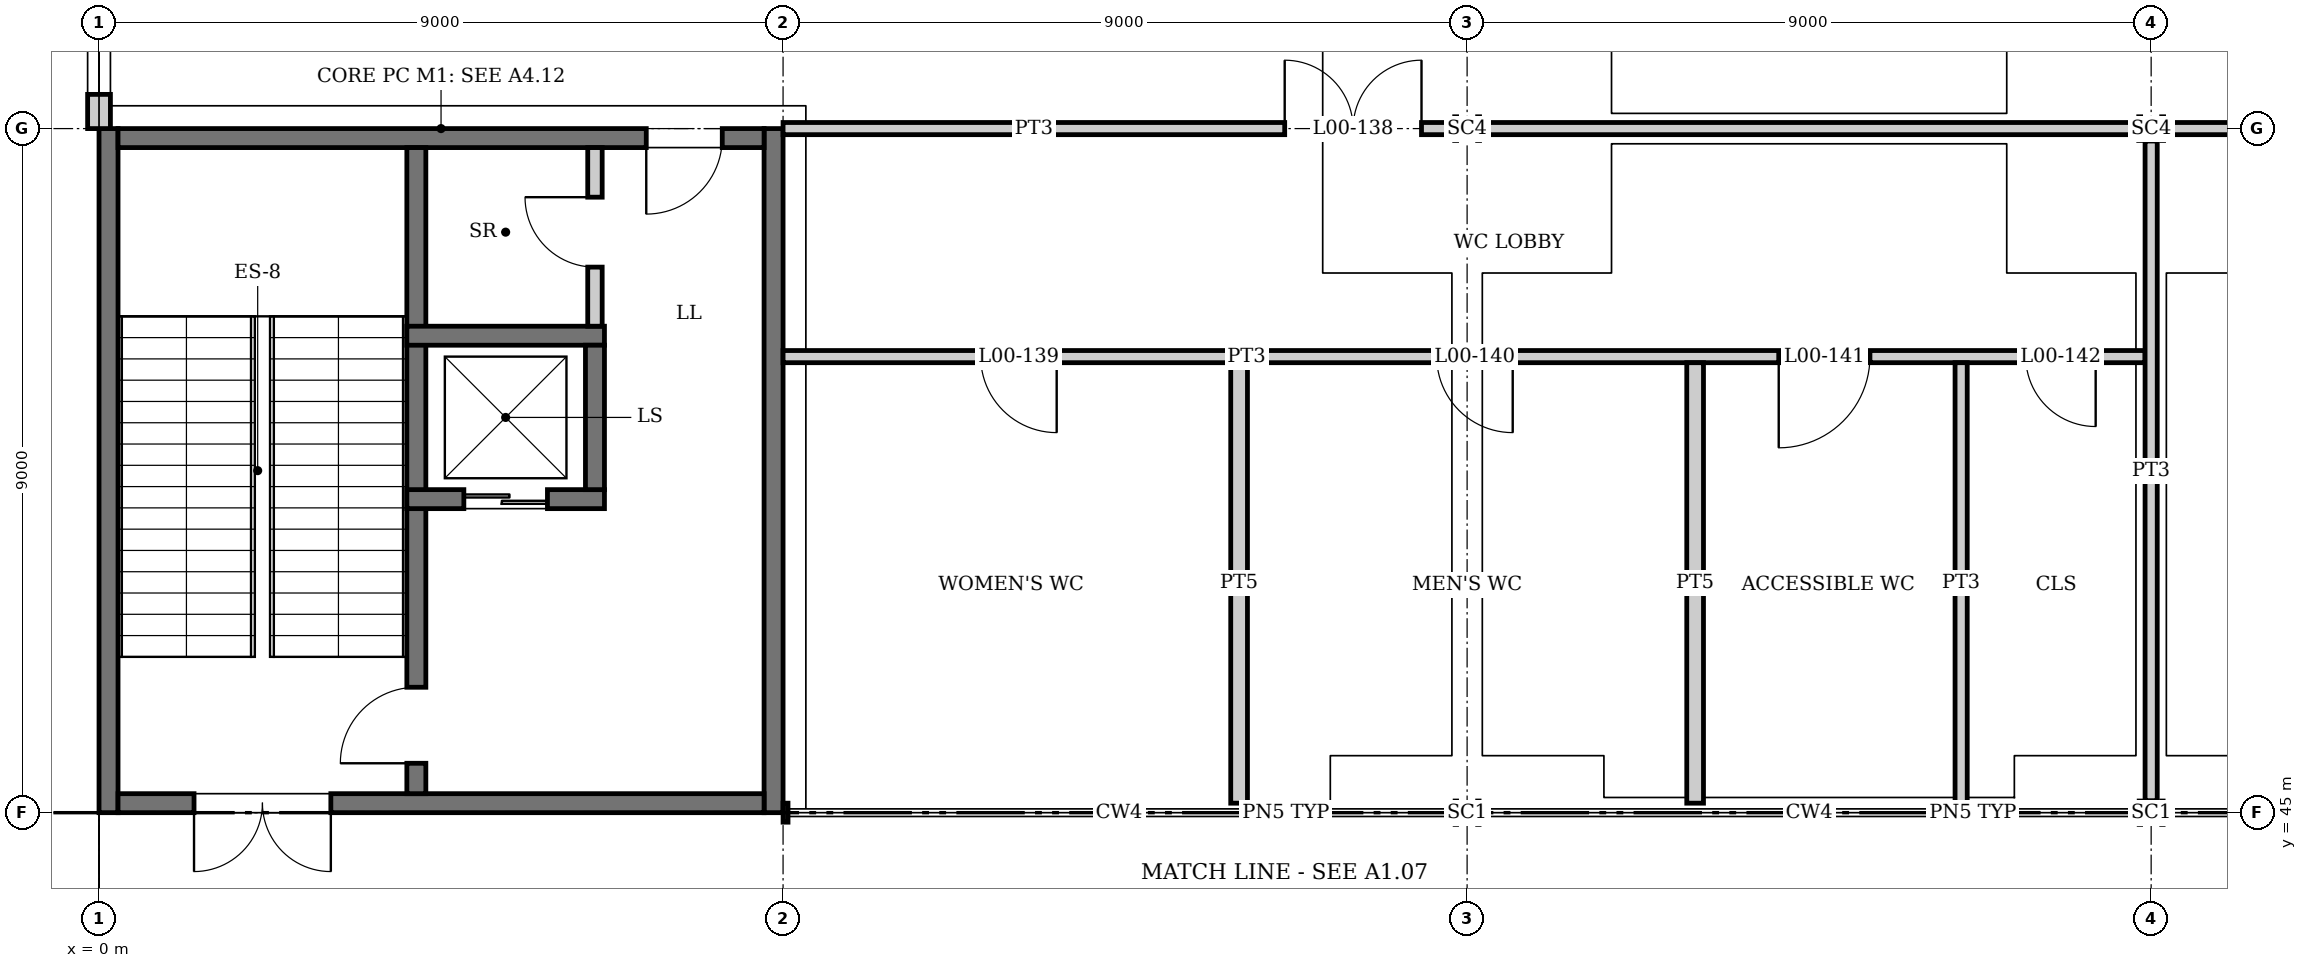
"""IFC4 building model, lengths in metres.
Left out: names, types, materials, properties, quantities, classifications, styles, units other than length and angle.
Written with IfcOpenShell. Run it as: python <this file> out.ifc"""

import sys

from ifc_helpers import new_model, si_unit, direction, frame, frame_2d, origin, origin_2d, place, context, subcontext, project, spatial, rectangle, i_section, extrude, element, fill, save


model = new_model("IFC4")
c1 = context("Model", 3, precision=1e-05, world=origin(), true_north=direction((0.0, 1.0)))
c2 = subcontext(c1, "Body", "Model", "MODEL_VIEW")
j1 = project(units=[si_unit("LENGTHUNIT", "METRE"), si_unit("PLANEANGLEUNIT", "RADIAN")], contexts=[c1])
p1 = place(None, origin())
s1 = spatial("IfcSite", under=j1, at=p1, CompositionType="ELEMENT")
p2 = place(p1, origin())
s2 = spatial("IfcBuilding", under=s1, at=p2, CompositionType="ELEMENT")
p3 = place(p2, origin())
s3 = spatial("IfcBuildingStorey", under=s2, at=p3, CompositionType="ELEMENT", Elevation=0.0)
p4 = place(p3, frame((18.0, 45.0, 0.0), z_axis=(0.0, 0.0, 1.0), x_axis=(0.0, 1.0, 0.0)))
e1 = element("IfcColumn", 1, at=p4, inside=s3, PredefinedType="COLUMN", context=c2, shape_type="SweptSolid", body=[
    extrude(i_section(OverallWidth=0.307, OverallDepth=0.315, WebThickness=0.012, FlangeThickness=0.019, at=origin_2d()), origin(), (0.0, 0.0, 1.0), 6.0),
])
p5 = place(p3, frame((18.0, 54.0, 0.0), z_axis=(0.0, 0.0, 1.0), x_axis=(0.0, 1.0, 0.0)))
e2 = element("IfcColumn", 2, at=p5, inside=s3, PredefinedType="COLUMN", context=c2, shape_type="SweptSolid", body=[
    extrude(i_section(OverallWidth=0.311, OverallDepth=0.327, WebThickness=0.016, FlangeThickness=0.025, at=origin_2d()), origin(), (0.0, 0.0, 1.0), 6.0),
])
p6 = place(p3, frame((27.0, 45.0, 0.0), z_axis=(0.0, 0.0, 1.0), x_axis=(0.0, 1.0, 0.0)))
e3 = element("IfcColumn", 3, at=p6, inside=s3, PredefinedType="COLUMN", context=c2, shape_type="SweptSolid", body=[
    extrude(i_section(OverallWidth=0.307, OverallDepth=0.315, WebThickness=0.012, FlangeThickness=0.019, at=origin_2d()), origin(), (0.0, 0.0, 1.0), 6.0),
])
p7 = place(p3, frame((27.0, 54.0, 0.0), z_axis=(0.0, 0.0, 1.0), x_axis=(0.0, 1.0, 0.0)))
e4 = element("IfcColumn", 4, at=p7, inside=s3, PredefinedType="COLUMN", context=c2, shape_type="SweptSolid", body=[
    extrude(i_section(OverallWidth=0.311, OverallDepth=0.327, WebThickness=0.016, FlangeThickness=0.025, at=origin_2d()), origin(), (0.0, 0.0, 1.0), 6.0),
])
for number, where, z_axis, x_axis in (
    (5, (0.125, 45.0, 0.0), (0.0, 0.0, 1.0), (0.0, 1.0, 0.0)),
    (6, (8.875, 45.0, 0.0), (0.0, 0.0, 1.0), (0.0, 1.0, 0.0)),
):
    element("IfcWall", number, at=place(p3, frame(where, z_axis=z_axis, x_axis=x_axis)), inside=s3, PredefinedType="SHEAR", context=c2, shape_type="SweptSolid", body=[
        extrude(rectangle(XDim=9.0, YDim=0.25, at=frame_2d((4.5, 0.0))), origin(), (0.0, 0.0, 1.0), 6.0),
    ])
p8 = place(p3, frame((0.25, 45.125, 0.0), z_axis=(0.0, 0.0, 1.0), x_axis=(1.0, 0.0, 0.0)))
e7 = element("IfcWall", 7, at=p8, inside=s3, PredefinedType="SHEAR", context=c2, shape_type="SweptSolid", body=[
    extrude(rectangle(XDim=8.5, YDim=0.25, at=frame_2d((4.25, 0.0))), origin(), (0.0, 0.0, 1.0), 6.0),
])
p9 = place(p8, frame((1.0, 0.0, 0.0)))
e8 = element("IfcOpeningElement", 8, at=p9, cuts=e7, PredefinedType="OPENING", context=c2, shape_type="SweptSolid", body=[
    extrude(rectangle(XDim=1.8, YDim=2.4, at=frame_2d((0.9, 1.2))), frame((0.0, 0.135, 0.0), z_axis=(0.0, -1.0, 0.0), x_axis=(1.0, 0.0, 0.0)), (0.0, 0.0, 1.0), 0.27),
])
p10 = place(p3, frame((0.25, 53.875, 0.0), z_axis=(0.0, 0.0, 1.0), x_axis=(1.0, 0.0, 0.0)))
e9 = element("IfcWall", 9, at=p10, inside=s3, PredefinedType="SHEAR", context=c2, shape_type="SweptSolid", body=[
    extrude(rectangle(XDim=8.5, YDim=0.25, at=frame_2d((4.25, 0.0))), origin(), (0.0, 0.0, 1.0), 6.0),
])
p11 = place(p10, frame((6.95, 0.0, 0.0)))
e10 = element("IfcOpeningElement", 10, at=p11, cuts=e9, PredefinedType="OPENING", context=c2, shape_type="SweptSolid", body=[
    extrude(rectangle(XDim=1.0, YDim=2.1, at=frame_2d((0.5, 1.05))), frame((0.0, 0.135, 0.0), z_axis=(0.0, -1.0, 0.0), x_axis=(1.0, 0.0, 0.0)), (0.0, 0.0, 1.0), 0.27),
])
p12 = place(p3, frame((0.0, 54.0, 0.0), z_axis=(0.0, 0.0, 1.0), x_axis=(0.0, 1.0, 0.0)))
e11 = element("IfcWall", 11, at=p12, inside=s3, PredefinedType="SOLIDWALL", context=c2, shape_type="SweptSolid", body=[
    extrude(rectangle(XDim=8.846, YDim=0.3, at=frame_2d((4.423, 0.0))), origin(), (0.0, 0.0, 1.0), 5.444),
])
p13 = place(p12, frame((0.45, 0.0, 0.3)))
e12 = element("IfcOpeningElement", 12, at=p13, cuts=e11, PredefinedType="OPENING", context=c2, shape_type="SweptSolid", body=[
    extrude(rectangle(XDim=3.6, YDim=3.0, at=frame_2d((1.8, 1.5))), frame((0.0, 0.16, 0.0), z_axis=(0.0, -1.0, 0.0), x_axis=(1.0, 0.0, 0.0)), (0.0, 0.0, 1.0), 0.32),
])
p14 = place(p12, frame((5.85, 0.0, 0.6)))
e13 = element("IfcOpeningElement", 13, at=p14, cuts=e11, PredefinedType="OPENING", context=c2, shape_type="SweptSolid", body=[
    extrude(rectangle(XDim=1.8, YDim=3.0, at=frame_2d((0.9, 1.5))), frame((0.0, 0.16, 0.0), z_axis=(0.0, -1.0, 0.0), x_axis=(1.0, 0.0, 0.0)), (0.0, 0.0, 1.0), 0.32),
])
p15 = place(p3, frame((4.175, 45.25, 0.0), z_axis=(0.0, 0.0, 1.0), x_axis=(0.0, 1.0, 0.0)))
e14 = element("IfcWall", 14, at=p15, inside=s3, PredefinedType="SOLIDWALL", context=c2, shape_type="SweptSolid", body=[
    extrude(rectangle(XDim=8.5, YDim=0.25, at=frame_2d((4.25, 0.0))), origin(), (0.0, 0.0, 1.0), 5.75),
])
p16 = place(p15, frame((0.4, 0.0, 0.0)))
e15 = element("IfcOpeningElement", 15, at=p16, cuts=e14, PredefinedType="OPENING", context=c2, shape_type="SweptSolid", body=[
    extrude(rectangle(XDim=1.0, YDim=2.1, at=frame_2d((0.5, 1.05))), frame((0.0, 0.135, 0.0), z_axis=(0.0, -1.0, 0.0), x_axis=(1.0, 0.0, 0.0)), (0.0, 0.0, 1.0), 0.27),
])
p17 = place(p3, frame((4.05, 49.125, -1.4), z_axis=(0.0, 0.0, 1.0), x_axis=(1.0, 0.0, 0.0)))
e16 = element("IfcWall", 16, at=p17, inside=s3, PredefinedType="SOLIDWALL", context=c2, shape_type="SweptSolid", body=[
    extrude(rectangle(XDim=2.6, YDim=0.25, at=frame_2d((1.3, 0.0))), origin(), (0.0, 0.0, 1.0), 7.4),
])
p18 = place(p17, frame((0.75, 0.0, 1.4)))
e17 = element("IfcOpeningElement", 17, at=p18, cuts=e16, PredefinedType="OPENING", context=c2, shape_type="SweptSolid", body=[
    extrude(rectangle(XDim=1.1, YDim=2.1, at=frame_2d((0.55, 1.05))), frame((0.0, 0.135, 0.0), z_axis=(0.0, -1.0, 0.0), x_axis=(1.0, 0.0, 0.0)), (0.0, 0.0, 1.0), 0.27),
])
p19 = place(p3, frame((4.05, 51.275, -1.4), z_axis=(0.0, 0.0, 1.0), x_axis=(1.0, 0.0, 0.0)))
e18 = element("IfcWall", 18, at=p19, inside=s3, PredefinedType="SOLIDWALL", context=c2, shape_type="SweptSolid", body=[
    extrude(rectangle(XDim=2.6, YDim=0.25, at=frame_2d((1.3, 0.0))), origin(), (0.0, 0.0, 1.0), 7.4),
])
p20 = place(p3, frame((6.525, 49.25, -1.4), z_axis=(0.0, 0.0, 1.0), x_axis=(0.0, 1.0, 0.0)))
e19 = element("IfcWall", 19, at=p20, inside=s3, PredefinedType="SOLIDWALL", context=c2, shape_type="SweptSolid", body=[
    extrude(rectangle(XDim=1.9, YDim=0.25, at=frame_2d((0.95, 0.0))), origin(), (0.0, 0.0, 1.0), 7.4),
])
p21 = place(p3, frame((9.0, 51.0, 0.0), z_axis=(0.0, 0.0, 1.0), x_axis=(1.0, 0.0, 0.0)))
e20 = element("IfcWall", 20, at=p21, inside=s3, PredefinedType="PARTITIONING", context=c2, shape_type="SweptSolid", body=[
    extrude(rectangle(XDim=17.92, YDim=0.16, at=frame_2d((8.96, 0.0))), origin(), (0.0, 0.0, 1.0), 5.447),
])
p22 = place(p21, frame((2.6, 0.0, 0.0)))
e21 = element("IfcOpeningElement", 21, at=p22, cuts=e20, PredefinedType="OPENING", context=c2, shape_type="SweptSolid", body=[
    extrude(rectangle(XDim=1.0, YDim=2.1, at=frame_2d((0.5, 1.05))), frame((0.0, 0.09, 0.0), z_axis=(0.0, -1.0, 0.0), x_axis=(1.0, 0.0, 0.0)), (0.0, 0.0, 1.0), 0.18),
])
p23 = place(p21, frame((8.6, 0.0, 0.0)))
e22 = element("IfcOpeningElement", 22, at=p23, cuts=e20, PredefinedType="OPENING", context=c2, shape_type="SweptSolid", body=[
    extrude(rectangle(XDim=1.0, YDim=2.1, at=frame_2d((0.5, 1.05))), frame((0.0, 0.09, 0.0), z_axis=(0.0, -1.0, 0.0), x_axis=(1.0, 0.0, 0.0)), (0.0, 0.0, 1.0), 0.18),
])
p24 = place(p21, frame((13.1, 0.0, 0.0)))
e23 = element("IfcOpeningElement", 23, at=p24, cuts=e20, PredefinedType="OPENING", context=c2, shape_type="SweptSolid", body=[
    extrude(rectangle(XDim=1.2, YDim=2.1, at=frame_2d((0.6, 1.05))), frame((0.0, 0.09, 0.0), z_axis=(0.0, -1.0, 0.0), x_axis=(1.0, 0.0, 0.0)), (0.0, 0.0, 1.0), 0.18),
])
p25 = place(p21, frame((16.35, 0.0, 0.0)))
e24 = element("IfcOpeningElement", 24, at=p25, cuts=e20, PredefinedType="OPENING", context=c2, shape_type="SweptSolid", body=[
    extrude(rectangle(XDim=0.92, YDim=2.1, at=frame_2d((0.46, 1.05))), frame((0.0, 0.09, 0.0), z_axis=(0.0, -1.0, 0.0), x_axis=(1.0, 0.0, 0.0)), (0.0, 0.0, 1.0), 0.18),
])
p26 = place(p3, frame((9.0, 54.0, 0.0), z_axis=(0.0, 0.0, 1.0), x_axis=(1.0, 0.0, 0.0)))
e25 = element("IfcWall", 25, at=p26, inside=s3, PredefinedType="PARTITIONING", context=c2, shape_type="SweptSolid", body=[
    extrude(rectangle(XDim=8.836, YDim=0.16, at=frame_2d((4.418, 0.0))), origin(), (0.0, 0.0, 1.0), 5.322),
])
p27 = place(p26, frame((6.6, 0.0, 0.0)))
e26 = element("IfcOpeningElement", 26, at=p27, cuts=e25, PredefinedType="OPENING", context=c2, shape_type="SweptSolid", body=[
    extrude(rectangle(XDim=1.8, YDim=2.1, at=frame_2d((0.9, 1.05))), frame((0.0, 0.09, 0.0), z_axis=(0.0, -1.0, 0.0), x_axis=(1.0, 0.0, 0.0)), (0.0, 0.0, 1.0), 0.18),
])
for number, where, z_axis, x_axis in (
    (27, (18.164, 54.0, 0.0), (0.0, 0.0, 1.0), (1.0, 0.0, 0.0)),
    (28, (27.164, 54.0, 0.0), (0.0, 0.0, 1.0), (1.0, 0.0, 0.0)),
):
    element("IfcWall", number, at=place(p3, frame(where, z_axis=z_axis, x_axis=x_axis)), inside=s3, PredefinedType="PARTITIONING", context=c2, shape_type="SweptSolid", body=[
        extrude(rectangle(XDim=8.673, YDim=0.16, at=frame_2d((4.336, 0.0))), origin(), (0.0, 0.0, 1.0), 5.322),
    ])
p28 = place(p3, frame((6.525, 51.4, 0.0), z_axis=(0.0, 0.0, 1.0), x_axis=(0.0, 1.0, 0.0)))
e29 = element("IfcWall", 29, at=p28, inside=s3, PredefinedType="PARTITIONING", context=c2, shape_type="SweptSolid", body=[
    extrude(rectangle(XDim=2.35, YDim=0.19, at=frame_2d((1.175, 0.0))), origin(), (0.0, 0.0, 1.0), 5.75),
])
p29 = place(p28, frame((0.778, 0.0, 0.0)))
e30 = element("IfcOpeningElement", 30, at=p29, cuts=e29, PredefinedType="OPENING", context=c2, shape_type="SweptSolid", body=[
    extrude(rectangle(XDim=0.92, YDim=2.1, at=frame_2d((0.46, 1.05))), frame((0.0, 0.105, 0.0), z_axis=(0.0, -1.0, 0.0), x_axis=(1.0, 0.0, 0.0)), (0.0, 0.0, 1.0), 0.21),
])
for number, where, z_axis, x_axis in (
    (31, (15.0, 45.125, 0.0), (0.0, 0.0, 1.0), (0.0, 1.0, 0.0)),
    (32, (21.0, 45.125, 0.0), (0.0, 0.0, 1.0), (0.0, 1.0, 0.0)),
):
    element("IfcWall", number, at=place(p3, frame(where, z_axis=z_axis, x_axis=x_axis)), inside=s3, PredefinedType="PLUMBINGWALL", context=c2, shape_type="SweptSolid", body=[
        extrude(rectangle(XDim=5.795, YDim=0.22, at=frame_2d((2.897, 0.0))), origin(), (0.0, 0.0, 1.0), 5.85),
    ])
p30 = place(p3, frame((24.5, 45.125, 0.0), z_axis=(0.0, 0.0, 1.0), x_axis=(0.0, 1.0, 0.0)))
e33 = element("IfcWall", 33, at=p30, inside=s3, PredefinedType="PARTITIONING", context=c2, shape_type="SweptSolid", body=[
    extrude(rectangle(XDim=5.795, YDim=0.16, at=frame_2d((2.897, 0.0))), origin(), (0.0, 0.0, 1.0), 5.85),
])
p31 = place(p3, frame((27.0, 45.157, 0.0), z_axis=(0.0, 0.0, 1.0), x_axis=(0.0, 1.0, 0.0)))
e34 = element("IfcWall", 34, at=p31, inside=s3, PredefinedType="PARTITIONING", context=c2, shape_type="SweptSolid", body=[
    extrude(rectangle(XDim=8.679, YDim=0.16, at=frame_2d((4.339, 0.0))), origin(), (0.0, 0.0, 1.0), 5.447),
])
p32 = place(p13, origin())
e35 = element("IfcWindow", 35, at=p32, inside=s3, PartitioningType="SINGLE_PANEL", PredefinedType="WINDOW", context=c2, shape_type="SweptSolid", body=[
    extrude(rectangle(XDim=3.6, YDim=3.0, at=frame_2d((1.8, 1.5))), frame((0.0, 0.03, 0.0), z_axis=(0.0, -1.0, 0.0), x_axis=(1.0, 0.0, 0.0)), (0.0, 0.0, 1.0), 0.06),
])
fill(e12, e35)
p33 = place(p9, frame((1.8, 0.0, 0.0), z_axis=(0.0, 0.0, 1.0), x_axis=(-1.0, 0.0, 0.0)))
e36 = element("IfcDoor", 36, at=p33, inside=s3, OperationType="DOUBLE_DOOR_SINGLE_SWING", PredefinedType="DOOR", context=c2, shape_type="SweptSolid", body=[
    extrude(rectangle(XDim=1.8, YDim=2.4, at=frame_2d((0.9, 1.2))), frame((0.0, 0.025, 0.0), z_axis=(0.0, -1.0, 0.0), x_axis=(1.0, 0.0, 0.0)), (0.0, 0.0, 1.0), 0.05),
])
fill(e8, e36)
p34 = place(p18, origin())
e37 = element("IfcDoor", 37, at=p34, inside=s3, OperationType="DOUBLE_DOOR_SLIDING", PredefinedType="DOOR", context=c2, shape_type="SweptSolid", body=[
    extrude(rectangle(XDim=1.1, YDim=2.1, at=frame_2d((0.55, 1.05))), frame((0.0, 0.025, 0.0), z_axis=(0.0, -1.0, 0.0), x_axis=(1.0, 0.0, 0.0)), (0.0, 0.0, 1.0), 0.05),
])
fill(e17, e37)
p35 = place(p16, origin())
e38 = element("IfcDoor", 38, at=p35, inside=s3, OperationType="SINGLE_SWING_LEFT", PredefinedType="DOOR", context=c2, shape_type="SweptSolid", body=[
    extrude(rectangle(XDim=1.0, YDim=2.1, at=frame_2d((0.5, 1.05))), frame((0.0, 0.025, 0.0), z_axis=(0.0, -1.0, 0.0), x_axis=(1.0, 0.0, 0.0)), (0.0, 0.0, 1.0), 0.05),
])
fill(e15, e38)
p36 = place(p11, frame((1.0, 0.0, 0.0), z_axis=(0.0, 0.0, 1.0), x_axis=(-1.0, 0.0, 0.0)))
e39 = element("IfcDoor", 39, at=p36, inside=s3, OperationType="SINGLE_SWING_RIGHT", PredefinedType="DOOR", context=c2, shape_type="SweptSolid", body=[
    extrude(rectangle(XDim=1.0, YDim=2.1, at=frame_2d((0.5, 1.05))), frame((0.0, 0.025, 0.0), z_axis=(0.0, -1.0, 0.0), x_axis=(1.0, 0.0, 0.0)), (0.0, 0.0, 1.0), 0.05),
])
fill(e10, e39)
p37 = place(p29, origin())
e40 = element("IfcDoor", 40, at=p37, inside=s3, OperationType="SINGLE_SWING_RIGHT", PredefinedType="DOOR", context=c2, shape_type="SweptSolid", body=[
    extrude(rectangle(XDim=0.92, YDim=2.1, at=frame_2d((0.46, 1.05))), frame((0.0, 0.025, 0.0), z_axis=(0.0, -1.0, 0.0), x_axis=(1.0, 0.0, 0.0)), (0.0, 0.0, 1.0), 0.05),
])
fill(e30, e40)
p38 = place(p27, origin())
e41 = element("IfcDoor", 41, at=p38, inside=s3, OperationType="DOUBLE_DOOR_SINGLE_SWING", PredefinedType="DOOR", context=c2, shape_type="SweptSolid", body=[
    extrude(rectangle(XDim=1.8, YDim=2.1, at=frame_2d((0.9, 1.05))), frame((0.0, 0.025, 0.0), z_axis=(0.0, -1.0, 0.0), x_axis=(1.0, 0.0, 0.0)), (0.0, 0.0, 1.0), 0.05),
])
fill(e26, e41)
p39 = place(p22, frame((1.0, 0.0, 0.0), z_axis=(0.0, 0.0, 1.0), x_axis=(-1.0, 0.0, 0.0)))
e42 = element("IfcDoor", 42, at=p39, inside=s3, OperationType="SINGLE_SWING_LEFT", PredefinedType="DOOR", context=c2, shape_type="SweptSolid", body=[
    extrude(rectangle(XDim=1.0, YDim=2.1, at=frame_2d((0.5, 1.05))), frame((0.0, 0.025, 0.0), z_axis=(0.0, -1.0, 0.0), x_axis=(1.0, 0.0, 0.0)), (0.0, 0.0, 1.0), 0.05),
])
fill(e21, e42)
p40 = place(p23, frame((1.0, 0.0, 0.0), z_axis=(0.0, 0.0, 1.0), x_axis=(-1.0, 0.0, 0.0)))
e43 = element("IfcDoor", 43, at=p40, inside=s3, OperationType="SINGLE_SWING_LEFT", PredefinedType="DOOR", context=c2, shape_type="SweptSolid", body=[
    extrude(rectangle(XDim=1.0, YDim=2.1, at=frame_2d((0.5, 1.05))), frame((0.0, 0.025, 0.0), z_axis=(0.0, -1.0, 0.0), x_axis=(1.0, 0.0, 0.0)), (0.0, 0.0, 1.0), 0.05),
])
fill(e22, e43)
p41 = place(p24, frame((1.2, 0.0, 0.0), z_axis=(0.0, 0.0, 1.0), x_axis=(-1.0, 0.0, 0.0)))
e44 = element("IfcDoor", 44, at=p41, inside=s3, OperationType="SINGLE_SWING_RIGHT", PredefinedType="DOOR", context=c2, shape_type="SweptSolid", body=[
    extrude(rectangle(XDim=1.2, YDim=2.1, at=frame_2d((0.6, 1.05))), frame((0.0, 0.025, 0.0), z_axis=(0.0, -1.0, 0.0), x_axis=(1.0, 0.0, 0.0)), (0.0, 0.0, 1.0), 0.05),
])
fill(e23, e44)
p42 = place(p25, frame((0.92, 0.0, 0.0), z_axis=(0.0, 0.0, 1.0), x_axis=(-1.0, 0.0, 0.0)))
e45 = element("IfcDoor", 45, at=p42, inside=s3, OperationType="SINGLE_SWING_LEFT", PredefinedType="DOOR", context=c2, shape_type="SweptSolid", body=[
    extrude(rectangle(XDim=0.92, YDim=2.1, at=frame_2d((0.46, 1.05))), frame((0.0, 0.025, 0.0), z_axis=(0.0, -1.0, 0.0), x_axis=(1.0, 0.0, 0.0)), (0.0, 0.0, 1.0), 0.05),
])
fill(e24, e45)
save(model, sys.argv[1])
